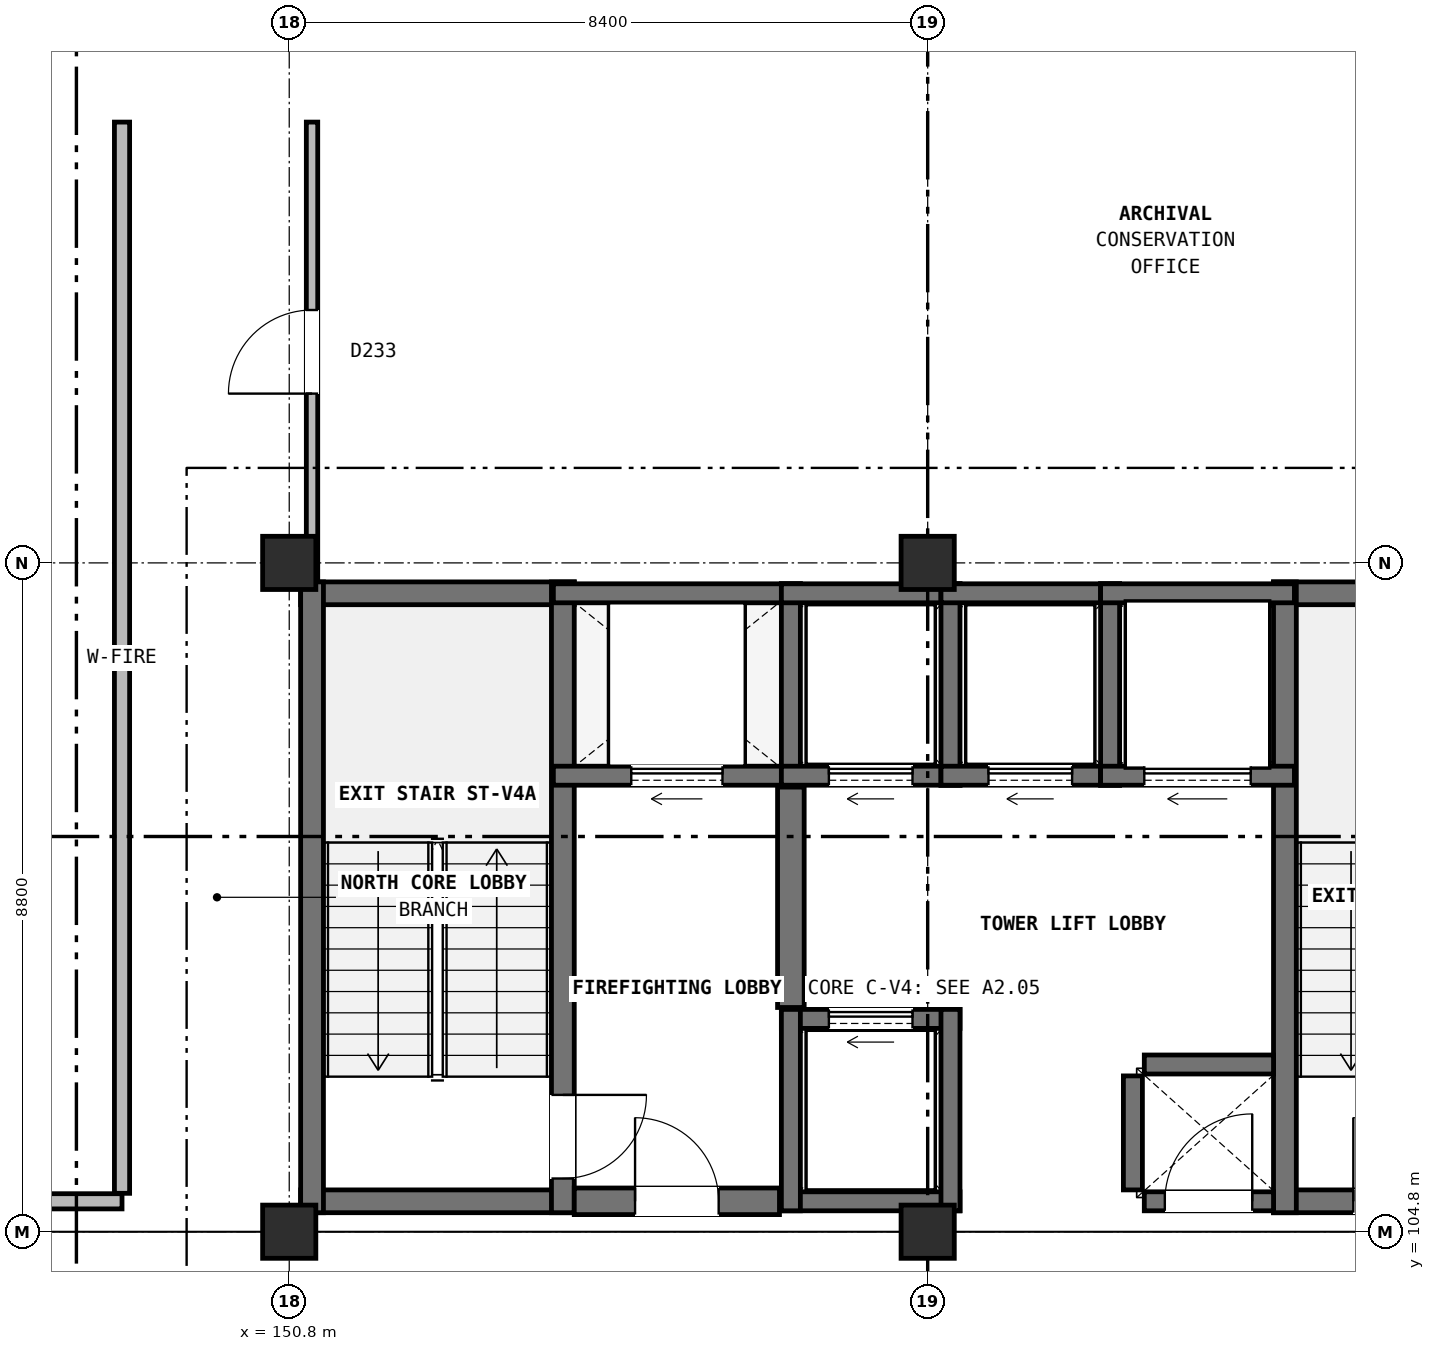
"""IFC4 building model, lengths in metres.
Left out: names, types, materials, properties, quantities, classifications, styles, units other than length and angle.
Written with IfcOpenShell. Run it as: python <this file> out.ifc"""

import sys

from ifc_helpers import new_model, si_unit, direction, frame, frame_2d, origin, origin_2d, place, context, subcontext, project, spatial, rectangle, extrude, element, fill, save


model = new_model("IFC4")
c1 = context("Model", 3, precision=1e-05, world=origin(), true_north=direction((0.0, 1.0)))
c2 = subcontext(c1, "Body", "Model", "MODEL_VIEW")
j1 = project(units=[si_unit("LENGTHUNIT", "METRE"), si_unit("PLANEANGLEUNIT", "RADIAN")], contexts=[c1])
p1 = place(None, origin())
s1 = spatial("IfcSite", under=j1, at=p1, CompositionType="ELEMENT")
p2 = place(p1, origin())
s2 = spatial("IfcBuilding", under=s1, at=p2, CompositionType="ELEMENT")
p3 = place(p2, frame((0.0, 0.0, 32.8)))
s3 = spatial("IfcBuildingStorey", under=s2, at=p3, CompositionType="ELEMENT", Elevation=32.8)
for number, where, z_axis, x_axis in (
    (1, (150.8, 104.8, 0.0), (0.0, 0.0, 1.0), (1.0, 0.0, 0.0)),
    (2, (150.8, 113.6, 0.0), (0.0, 0.0, 1.0), (1.0, 0.0, 0.0)),
    (3, (159.2, 104.8, 0.0), (0.0, 0.0, 1.0), (1.0, 0.0, 0.0)),
    (4, (159.2, 113.6, 0.0), (0.0, 0.0, 1.0), (1.0, 0.0, 0.0)),
):
    element("IfcColumn", number, at=place(p3, frame(where, z_axis=z_axis, x_axis=x_axis)), inside=s3, PredefinedType="COLUMN", context=c2, shape_type="SweptSolid", body=[
        extrude(rectangle(XDim=0.7, YDim=0.7, at=origin_2d()), origin(), (0.0, 0.0, 1.0), 4.0),
    ])
for number, where, z_axis, x_axis in (
    (5, (150.95, 105.2, 0.0), (0.0, 0.0, 1.0), (1.0, 0.0, 0.0)),
    (6, (150.95, 113.2, 0.0), (0.0, 0.0, 1.0), (1.0, 0.0, 0.0)),
):
    element("IfcWall", number, at=place(p3, frame(where, z_axis=z_axis, x_axis=x_axis)), inside=s3, PredefinedType="SHEAR", context=c2, shape_type="SweptSolid", body=[
        extrude(rectangle(XDim=3.6, YDim=0.3, at=frame_2d((1.8, 0.0))), origin(), (0.0, 0.0, 1.0), 4.0),
    ])
p4 = place(p3, frame((151.1, 105.05, 0.0), z_axis=(0.0, 0.0, 1.0), x_axis=(0.0, 1.0, 0.0)))
e7 = element("IfcWall", 7, at=p4, inside=s3, PredefinedType="SHEAR", context=c2, shape_type="SweptSolid", body=[
    extrude(rectangle(XDim=8.3, YDim=0.3, at=frame_2d((4.15, 0.0))), origin(), (0.0, 0.0, 1.0), 4.0),
])
p5 = place(p3, frame((154.4, 105.05, 0.0), z_axis=(0.0, 0.0, 1.0), x_axis=(0.0, 1.0, 0.0)))
e8 = element("IfcWall", 8, at=p5, inside=s3, PredefinedType="SHEAR", context=c2, shape_type="SweptSolid", body=[
    extrude(rectangle(XDim=8.3, YDim=0.3, at=frame_2d((4.15, 0.0))), origin(), (0.0, 0.0, 1.0), 4.0),
])
p6 = place(p5, frame((0.45, 0.0, 0.0)))
e9 = element("IfcOpeningElement", 9, at=p6, cuts=e8, PredefinedType="OPENING", context=c2, shape_type="SweptSolid", body=[
    extrude(rectangle(XDim=1.1, YDim=2.2, at=frame_2d((0.55, 1.1))), frame((0.0, 0.16, 0.0), z_axis=(0.0, -1.0, 0.0), x_axis=(1.0, 0.0, 0.0)), (0.0, 0.0, 1.0), 0.32),
])
p7 = place(p3, frame((163.75, 105.2, 0.0), z_axis=(0.0, 0.0, 1.0), x_axis=(1.0, 0.0, 0.0)))
e10 = element("IfcWall", 10, at=p7, inside=s3, PredefinedType="SHEAR", context=c2, shape_type="SweptSolid", body=[
    extrude(rectangle(XDim=3.6, YDim=0.3, at=frame_2d((1.8, 0.0))), origin(), (0.0, 0.0, 1.0), 4.0),
])
p8 = place(p7, frame((1.05, 0.0, 0.0)))
e11 = element("IfcOpeningElement", 11, at=p8, cuts=e10, PredefinedType="OPENING", context=c2, shape_type="SweptSolid", body=[
    extrude(rectangle(XDim=1.1, YDim=2.2, at=frame_2d((0.55, 1.1))), frame((0.0, 0.16, 0.0), z_axis=(0.0, -1.0, 0.0), x_axis=(1.0, 0.0, 0.0)), (0.0, 0.0, 1.0), 0.32),
])
p9 = place(p3, frame((163.75, 113.2, 0.0), z_axis=(0.0, 0.0, 1.0), x_axis=(1.0, 0.0, 0.0)))
e12 = element("IfcWall", 12, at=p9, inside=s3, PredefinedType="SHEAR", context=c2, shape_type="SweptSolid", body=[
    extrude(rectangle(XDim=3.6, YDim=0.3, at=frame_2d((1.8, 0.0))), origin(), (0.0, 0.0, 1.0), 4.0),
])
p10 = place(p3, frame((163.9, 105.05, 0.0), z_axis=(0.0, 0.0, 1.0), x_axis=(0.0, 1.0, 0.0)))
e13 = element("IfcWall", 13, at=p10, inside=s3, PredefinedType="SHEAR", context=c2, shape_type="SweptSolid", body=[
    extrude(rectangle(XDim=8.3, YDim=0.3, at=frame_2d((4.15, 0.0))), origin(), (0.0, 0.0, 1.0), 4.0),
])
p11 = place(p3, frame((154.275, 110.8, 0.0), z_axis=(0.0, 0.0, 1.0), x_axis=(1.0, 0.0, 0.0)))
e14 = element("IfcWall", 14, at=p11, inside=s3, PredefinedType="SOLIDWALL", context=c2, shape_type="SweptSolid", body=[
    extrude(rectangle(XDim=3.25, YDim=0.25, at=frame_2d((1.625, 0.0))), origin(), (0.0, 0.0, 1.0), 3.68),
])
p12 = place(p11, frame((1.025, 0.0, 0.0)))
e15 = element("IfcOpeningElement", 15, at=p12, cuts=e14, PredefinedType="OPENING", context=c2, shape_type="SweptSolid", body=[
    extrude(rectangle(XDim=1.2, YDim=2.2, at=frame_2d((0.6, 1.1))), frame((0.0, 0.135, 0.0), z_axis=(0.0, -1.0, 0.0), x_axis=(1.0, 0.0, 0.0)), (0.0, 0.0, 1.0), 0.27),
])
p13 = place(p3, frame((154.275, 113.2, 0.0), z_axis=(0.0, 0.0, 1.0), x_axis=(1.0, 0.0, 0.0)))
e16 = element("IfcWall", 16, at=p13, inside=s3, PredefinedType="SOLIDWALL", context=c2, shape_type="SweptSolid", body=[
    extrude(rectangle(XDim=3.25, YDim=0.25, at=frame_2d((1.625, 0.0))), origin(), (0.0, 0.0, 1.0), 3.68),
])
p14 = place(p3, frame((157.4, 110.675, 0.0), z_axis=(0.0, 0.0, 1.0), x_axis=(0.0, 1.0, 0.0)))
e17 = element("IfcWall", 17, at=p14, inside=s3, PredefinedType="SOLIDWALL", context=c2, shape_type="SweptSolid", body=[
    extrude(rectangle(XDim=2.65, YDim=0.25, at=frame_2d((1.325, 0.0))), origin(), (0.0, 0.0, 1.0), 3.68),
])
p15 = place(p3, frame((157.275, 110.8, 0.0), z_axis=(0.0, 0.0, 1.0), x_axis=(1.0, 0.0, 0.0)))
e18 = element("IfcWall", 18, at=p15, inside=s3, PredefinedType="SOLIDWALL", context=c2, shape_type="SweptSolid", body=[
    extrude(rectangle(XDim=2.35, YDim=0.25, at=frame_2d((1.175, 0.0))), origin(), (0.0, 0.0, 1.0), 3.68),
])
p16 = place(p15, frame((0.625, 0.0, 0.0)))
e19 = element("IfcOpeningElement", 19, at=p16, cuts=e18, PredefinedType="OPENING", context=c2, shape_type="SweptSolid", body=[
    extrude(rectangle(XDim=1.1, YDim=2.2, at=frame_2d((0.55, 1.1))), frame((0.0, 0.135, 0.0), z_axis=(0.0, -1.0, 0.0), x_axis=(1.0, 0.0, 0.0)), (0.0, 0.0, 1.0), 0.27),
])
p17 = place(p3, frame((157.275, 113.2, 0.0), z_axis=(0.0, 0.0, 1.0), x_axis=(1.0, 0.0, 0.0)))
e20 = element("IfcWall", 20, at=p17, inside=s3, PredefinedType="SOLIDWALL", context=c2, shape_type="SweptSolid", body=[
    extrude(rectangle(XDim=2.35, YDim=0.25, at=frame_2d((1.175, 0.0))), origin(), (0.0, 0.0, 1.0), 3.68),
])
p18 = place(p3, frame((159.5, 110.675, 0.0), z_axis=(0.0, 0.0, 1.0), x_axis=(0.0, 1.0, 0.0)))
e21 = element("IfcWall", 21, at=p18, inside=s3, PredefinedType="SOLIDWALL", context=c2, shape_type="SweptSolid", body=[
    extrude(rectangle(XDim=2.65, YDim=0.25, at=frame_2d((1.325, 0.0))), origin(), (0.0, 0.0, 1.0), 3.68),
])
p19 = place(p3, frame((159.375, 110.8, 0.0), z_axis=(0.0, 0.0, 1.0), x_axis=(1.0, 0.0, 0.0)))
e22 = element("IfcWall", 22, at=p19, inside=s3, PredefinedType="SOLIDWALL", context=c2, shape_type="SweptSolid", body=[
    extrude(rectangle(XDim=2.35, YDim=0.25, at=frame_2d((1.175, 0.0))), origin(), (0.0, 0.0, 1.0), 3.68),
])
p20 = place(p19, frame((0.625, 0.0, 0.0)))
e23 = element("IfcOpeningElement", 23, at=p20, cuts=e22, PredefinedType="OPENING", context=c2, shape_type="SweptSolid", body=[
    extrude(rectangle(XDim=1.1, YDim=2.2, at=frame_2d((0.55, 1.1))), frame((0.0, 0.135, 0.0), z_axis=(0.0, -1.0, 0.0), x_axis=(1.0, 0.0, 0.0)), (0.0, 0.0, 1.0), 0.27),
])
p21 = place(p3, frame((159.375, 113.2, 0.0), z_axis=(0.0, 0.0, 1.0), x_axis=(1.0, 0.0, 0.0)))
e24 = element("IfcWall", 24, at=p21, inside=s3, PredefinedType="SOLIDWALL", context=c2, shape_type="SweptSolid", body=[
    extrude(rectangle(XDim=2.35, YDim=0.25, at=frame_2d((1.175, 0.0))), origin(), (0.0, 0.0, 1.0), 3.68),
])
p22 = place(p3, frame((161.6, 110.675, 0.0), z_axis=(0.0, 0.0, 1.0), x_axis=(0.0, 1.0, 0.0)))
e25 = element("IfcWall", 25, at=p22, inside=s3, PredefinedType="SOLIDWALL", context=c2, shape_type="SweptSolid", body=[
    extrude(rectangle(XDim=2.65, YDim=0.25, at=frame_2d((1.325, 0.0))), origin(), (0.0, 0.0, 1.0), 3.68),
])
p23 = place(p3, frame((157.275, 105.2, 0.0), z_axis=(0.0, 0.0, 1.0), x_axis=(1.0, 0.0, 0.0)))
e26 = element("IfcWall", 26, at=p23, inside=s3, PredefinedType="SOLIDWALL", context=c2, shape_type="SweptSolid", body=[
    extrude(rectangle(XDim=2.35, YDim=0.25, at=frame_2d((1.175, 0.0))), origin(), (0.0, 0.0, 1.0), 3.68),
])
p24 = place(p3, frame((157.275, 107.6, 0.0), z_axis=(0.0, 0.0, 1.0), x_axis=(1.0, 0.0, 0.0)))
e27 = element("IfcWall", 27, at=p24, inside=s3, PredefinedType="SOLIDWALL", context=c2, shape_type="SweptSolid", body=[
    extrude(rectangle(XDim=2.35, YDim=0.25, at=frame_2d((1.175, 0.0))), origin(), (0.0, 0.0, 1.0), 3.68),
])
p25 = place(p24, frame((0.625, 0.0, 0.0)))
e28 = element("IfcOpeningElement", 28, at=p25, cuts=e27, PredefinedType="OPENING", context=c2, shape_type="SweptSolid", body=[
    extrude(rectangle(XDim=1.1, YDim=2.2, at=frame_2d((0.55, 1.1))), frame((0.0, 0.135, 0.0), z_axis=(0.0, -1.0, 0.0), x_axis=(1.0, 0.0, 0.0)), (0.0, 0.0, 1.0), 0.27),
])
for number, where, z_axis, x_axis in (
    (29, (157.4, 105.075, 0.0), (0.0, 0.0, 1.0), (0.0, 1.0, 0.0)),
    (30, (159.5, 105.075, 0.0), (0.0, 0.0, 1.0), (0.0, 1.0, 0.0)),
):
    element("IfcWall", number, at=place(p3, frame(where, z_axis=z_axis, x_axis=x_axis)), inside=s3, PredefinedType="SOLIDWALL", context=c2, shape_type="SweptSolid", body=[
        extrude(rectangle(XDim=2.65, YDim=0.25, at=frame_2d((1.325, 0.0))), origin(), (0.0, 0.0, 1.0), 3.68),
    ])
p26 = place(p3, frame((161.475, 110.8, 0.0), z_axis=(0.0, 0.0, 1.0), x_axis=(1.0, 0.0, 0.0)))
e31 = element("IfcWall", 31, at=p26, inside=s3, PredefinedType="SOLIDWALL", context=c2, shape_type="SweptSolid", body=[
    extrude(rectangle(XDim=2.55, YDim=0.25, at=frame_2d((1.275, 0.0))), origin(), (0.0, 0.0, 1.0), 3.68),
])
p27 = place(p26, frame((0.575, 0.0, 0.0)))
e32 = element("IfcOpeningElement", 32, at=p27, cuts=e31, PredefinedType="OPENING", context=c2, shape_type="SweptSolid", body=[
    extrude(rectangle(XDim=1.4, YDim=2.3, at=frame_2d((0.7, 1.15))), frame((0.0, 0.135, 0.0), z_axis=(0.0, -1.0, 0.0), x_axis=(1.0, 0.0, 0.0)), (0.0, 0.0, 1.0), 0.27),
])
p28 = place(p3, frame((161.475, 113.2, 0.0), z_axis=(0.0, 0.0, 1.0), x_axis=(1.0, 0.0, 0.0)))
e33 = element("IfcWall", 33, at=p28, inside=s3, PredefinedType="SOLIDWALL", context=c2, shape_type="SweptSolid", body=[
    extrude(rectangle(XDim=2.55, YDim=0.25, at=frame_2d((1.275, 0.0))), origin(), (0.0, 0.0, 1.0), 3.68),
])
p29 = place(p3, frame((157.4, 107.75, 0.0), z_axis=(0.0, 0.0, 1.0), x_axis=(0.0, 1.0, 0.0)))
e34 = element("IfcWall", 34, at=p29, inside=s3, PredefinedType="SHEAR", context=c2, shape_type="SweptSolid", body=[
    extrude(rectangle(XDim=2.9, YDim=0.35, at=frame_2d((1.45, 0.0))), origin(), (0.0, 0.0, 1.0), 3.68),
])
p30 = place(p3, frame((154.55, 105.2, 0.0), z_axis=(0.0, 0.0, 1.0), x_axis=(1.0, 0.0, 0.0)))
e35 = element("IfcWall", 35, at=p30, inside=s3, PredefinedType="SHEAR", context=c2, shape_type="SweptSolid", body=[
    extrude(rectangle(XDim=2.7, YDim=0.35, at=frame_2d((1.35, 0.0))), origin(), (0.0, 0.0, 1.0), 3.68),
])
p31 = place(p30, frame((0.8, 0.0, 0.0)))
e36 = element("IfcOpeningElement", 36, at=p31, cuts=e35, PredefinedType="OPENING", context=c2, shape_type="SweptSolid", body=[
    extrude(rectangle(XDim=1.1, YDim=2.2, at=frame_2d((0.55, 1.1))), frame((0.0, 0.185, 0.0), z_axis=(0.0, -1.0, 0.0), x_axis=(1.0, 0.0, 0.0)), (0.0, 0.0, 1.0), 0.37),
])
p32 = place(p3, frame((161.9, 105.35, 0.0), z_axis=(0.0, 0.0, 1.0), x_axis=(0.0, 1.0, 0.0)))
e37 = element("IfcWall", 37, at=p32, inside=s3, PredefinedType="SOLIDWALL", context=c2, shape_type="SweptSolid", body=[
    extrude(rectangle(XDim=1.5, YDim=0.25, at=frame_2d((0.75, 0.0))), origin(), (0.0, 0.0, 1.0), 3.68),
])
p33 = place(p3, frame((162.05, 107.0, 0.0), z_axis=(0.0, 0.0, 1.0), x_axis=(1.0, 0.0, 0.0)))
e38 = element("IfcWall", 38, at=p33, inside=s3, PredefinedType="SOLIDWALL", context=c2, shape_type="SweptSolid", body=[
    extrude(rectangle(XDim=1.7, YDim=0.25, at=frame_2d((0.85, 0.0))), origin(), (0.0, 0.0, 1.0), 3.68),
])
p34 = place(p3, frame((162.05, 105.2, 0.0), z_axis=(0.0, 0.0, 1.0), x_axis=(1.0, 0.0, 0.0)))
e39 = element("IfcWall", 39, at=p34, inside=s3, PredefinedType="SOLIDWALL", context=c2, shape_type="SweptSolid", body=[
    extrude(rectangle(XDim=1.7, YDim=0.25, at=frame_2d((0.85, 0.0))), origin(), (0.0, 0.0, 1.0), 3.68),
])
p35 = place(p34, frame((0.27, 0.0, 0.0)))
e40 = element("IfcOpeningElement", 40, at=p35, cuts=e39, PredefinedType="OPENING", context=c2, shape_type="SweptSolid", body=[
    extrude(rectangle(XDim=1.15, YDim=2.2, at=frame_2d((0.575, 1.1))), frame((0.0, 0.135, 0.0), z_axis=(0.0, -1.0, 0.0), x_axis=(1.0, 0.0, 0.0)), (0.0, 0.0, 1.0), 0.27),
])
p36 = place(p3, frame((134.35, 105.2, 0.0), z_axis=(0.0, 0.0, 1.0), x_axis=(1.0, 0.0, 0.0)))
e41 = element("IfcWall", 41, at=p36, inside=s3, PredefinedType="PARTITIONING", context=c2, shape_type="SweptSolid", body=[
    extrude(rectangle(XDim=14.25, YDim=0.2, at=frame_2d((7.125, 0.0))), origin(), (0.0, 0.0, 1.0), 3.245),
])
p37 = place(p36, frame((5.615, 0.0, 0.0)))
e42 = element("IfcOpeningElement", 42, at=p37, cuts=e41, PredefinedType="OPENING", context=c2, shape_type="SweptSolid", body=[
    extrude(rectangle(XDim=1.62, YDim=2.25, at=frame_2d((0.81, 1.125))), frame((0.0, 0.11, 0.0), z_axis=(0.0, -1.0, 0.0), x_axis=(1.0, 0.0, 0.0)), (0.0, 0.0, 1.0), 0.22),
])
p38 = place(p3, frame((148.6, 105.305, 0.0), z_axis=(0.0, 0.0, 1.0), x_axis=(0.0, 1.0, 0.0)))
e43 = element("IfcWall", 43, at=p38, inside=s3, PredefinedType="PARTITIONING", context=c2, shape_type="SweptSolid", body=[
    extrude(rectangle(XDim=14.095, YDim=0.2, at=frame_2d((7.047, 0.0))), origin(), (0.0, 0.0, 1.0), 3.665),
])
p39 = place(p3, frame((151.1, 113.355, 0.0), z_axis=(0.0, 0.0, 1.0), x_axis=(0.0, 1.0, 0.0)))
e44 = element("IfcWall", 44, at=p39, inside=s3, PredefinedType="PARTITIONING", context=c2, shape_type="SweptSolid", body=[
    extrude(rectangle(XDim=6.045, YDim=0.15, at=frame_2d((3.022, 0.0))), origin(), (0.0, 0.0, 1.0), 3.245),
])
p40 = place(p39, frame((2.472, 0.0, 0.0)))
e45 = element("IfcOpeningElement", 45, at=p40, cuts=e44, PredefinedType="OPENING", context=c2, shape_type="SweptSolid", body=[
    extrude(rectangle(XDim=1.1, YDim=2.15, at=frame_2d((0.55, 1.075))), frame((0.0, 0.085, 0.0), z_axis=(0.0, -1.0, 0.0), x_axis=(1.0, 0.0, 0.0)), (0.0, 0.0, 1.0), 0.17),
])
p41 = place(p6, frame((1.1, 0.0, 0.0), z_axis=(0.0, 0.0, 1.0), x_axis=(-1.0, 0.0, 0.0)))
e46 = element("IfcDoor", 46, at=p41, inside=s3, OperationType="SINGLE_SWING_RIGHT", PredefinedType="DOOR", context=c2, shape_type="SweptSolid", body=[
    extrude(rectangle(XDim=1.1, YDim=2.2, at=frame_2d((0.55, 1.1))), frame((0.0, 0.025, 0.0), z_axis=(0.0, -1.0, 0.0), x_axis=(1.0, 0.0, 0.0)), (0.0, 0.0, 1.0), 0.05),
])
fill(e9, e46)
p42 = place(p8, origin())
e47 = element("IfcDoor", 47, at=p42, inside=s3, OperationType="SINGLE_SWING_LEFT", PredefinedType="DOOR", context=c2, shape_type="SweptSolid", body=[
    extrude(rectangle(XDim=1.1, YDim=2.2, at=frame_2d((0.55, 1.1))), frame((0.0, 0.025, 0.0), z_axis=(0.0, -1.0, 0.0), x_axis=(1.0, 0.0, 0.0)), (0.0, 0.0, 1.0), 0.05),
])
fill(e11, e47)
p43 = place(p12, origin())
e48 = element("IfcDoor", 48, at=p43, inside=s3, OperationType="SLIDING_TO_LEFT", PredefinedType="DOOR", context=c2, shape_type="SweptSolid", body=[
    extrude(rectangle(XDim=1.2, YDim=2.2, at=frame_2d((0.6, 1.1))), frame((0.0, 0.025, 0.0), z_axis=(0.0, -1.0, 0.0), x_axis=(1.0, 0.0, 0.0)), (0.0, 0.0, 1.0), 0.05),
])
fill(e15, e48)
p44 = place(p16, origin())
e49 = element("IfcDoor", 49, at=p44, inside=s3, OperationType="SLIDING_TO_LEFT", PredefinedType="DOOR", context=c2, shape_type="SweptSolid", body=[
    extrude(rectangle(XDim=1.1, YDim=2.2, at=frame_2d((0.55, 1.1))), frame((0.0, 0.025, 0.0), z_axis=(0.0, -1.0, 0.0), x_axis=(1.0, 0.0, 0.0)), (0.0, 0.0, 1.0), 0.05),
])
fill(e19, e49)
p45 = place(p20, origin())
e50 = element("IfcDoor", 50, at=p45, inside=s3, OperationType="SLIDING_TO_LEFT", PredefinedType="DOOR", context=c2, shape_type="SweptSolid", body=[
    extrude(rectangle(XDim=1.1, YDim=2.2, at=frame_2d((0.55, 1.1))), frame((0.0, 0.025, 0.0), z_axis=(0.0, -1.0, 0.0), x_axis=(1.0, 0.0, 0.0)), (0.0, 0.0, 1.0), 0.05),
])
fill(e23, e50)
p46 = place(p25, origin())
e51 = element("IfcDoor", 51, at=p46, inside=s3, OperationType="SLIDING_TO_LEFT", PredefinedType="DOOR", context=c2, shape_type="SweptSolid", body=[
    extrude(rectangle(XDim=1.1, YDim=2.2, at=frame_2d((0.55, 1.1))), frame((0.0, 0.025, 0.0), z_axis=(0.0, -1.0, 0.0), x_axis=(1.0, 0.0, 0.0)), (0.0, 0.0, 1.0), 0.05),
])
fill(e28, e51)
p47 = place(p27, origin())
e52 = element("IfcDoor", 52, at=p47, inside=s3, OperationType="SLIDING_TO_LEFT", PredefinedType="DOOR", context=c2, shape_type="SweptSolid", body=[
    extrude(rectangle(XDim=1.4, YDim=2.3, at=frame_2d((0.7, 1.15))), frame((0.0, 0.025, 0.0), z_axis=(0.0, -1.0, 0.0), x_axis=(1.0, 0.0, 0.0)), (0.0, 0.0, 1.0), 0.05),
])
fill(e32, e52)
p48 = place(p31, origin())
e53 = element("IfcDoor", 53, at=p48, inside=s3, OperationType="SINGLE_SWING_LEFT", PredefinedType="DOOR", context=c2, shape_type="SweptSolid", body=[
    extrude(rectangle(XDim=1.1, YDim=2.2, at=frame_2d((0.55, 1.1))), frame((0.0, 0.025, 0.0), z_axis=(0.0, -1.0, 0.0), x_axis=(1.0, 0.0, 0.0)), (0.0, 0.0, 1.0), 0.05),
])
fill(e36, e53)
p49 = place(p35, origin())
e54 = element("IfcDoor", 54, at=p49, inside=s3, OperationType="SINGLE_SWING_RIGHT", PredefinedType="DOOR", context=c2, shape_type="SweptSolid", body=[
    extrude(rectangle(XDim=1.15, YDim=2.2, at=frame_2d((0.575, 1.1))), frame((0.0, 0.025, 0.0), z_axis=(0.0, -1.0, 0.0), x_axis=(1.0, 0.0, 0.0)), (0.0, 0.0, 1.0), 0.05),
])
fill(e40, e54)
p50 = place(p40, origin())
e55 = element("IfcDoor", 55, at=p50, inside=s3, OperationType="SINGLE_SWING_LEFT", PredefinedType="DOOR", context=c2, shape_type="SweptSolid", body=[
    extrude(rectangle(XDim=1.1, YDim=2.15, at=frame_2d((0.55, 1.075))), frame((0.0, 0.025, 0.0), z_axis=(0.0, -1.0, 0.0), x_axis=(1.0, 0.0, 0.0)), (0.0, 0.0, 1.0), 0.05),
])
fill(e45, e55)
save(model, sys.argv[1])
